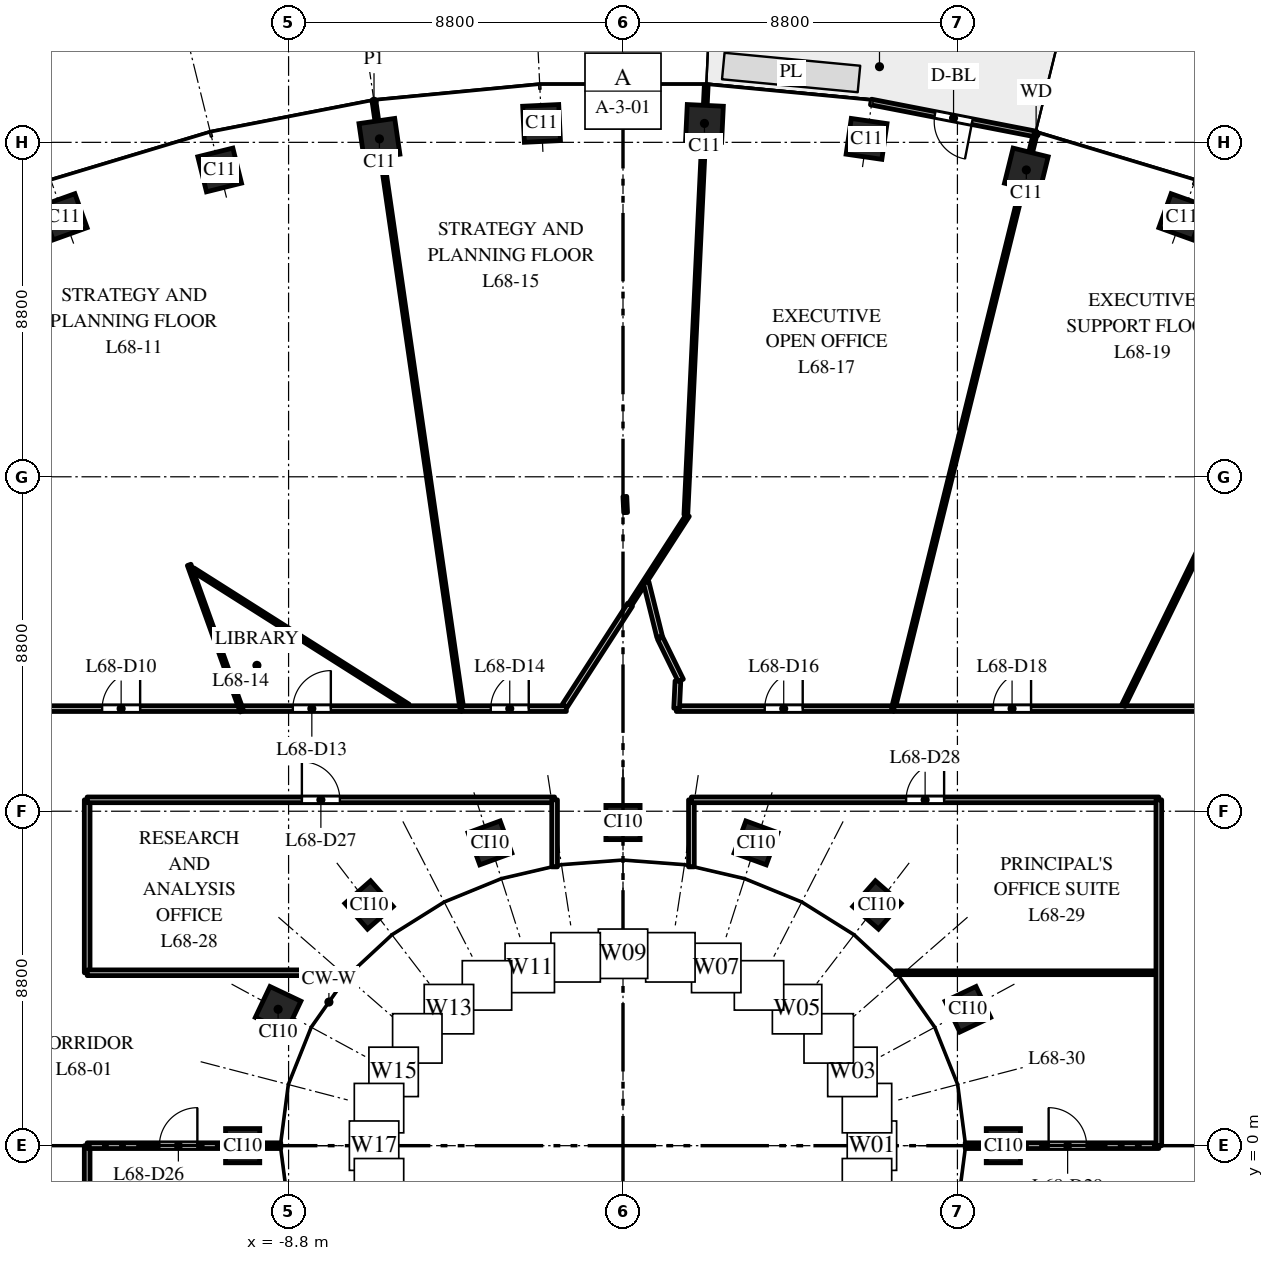
"""IFC4 building model, lengths in metres.
Left out: names, types, materials, properties, quantities, classifications, styles, units other than length and angle.
Written with IfcOpenShell. Run it as: python <this file> out.ifc"""

import sys

from ifc_helpers import new_model, si_unit, direction, frame, frame_2d, origin, origin_2d, place, context, subcontext, project, spatial, rectangle, extrude, element, fill, save


model = new_model("IFC4")
c1 = context("Model", 3, precision=1e-05, world=origin(), true_north=direction((0.0, 1.0)))
c2 = subcontext(c1, "Body", "Model", "MODEL_VIEW")
j1 = project(units=[si_unit("LENGTHUNIT", "METRE"), si_unit("PLANEANGLEUNIT", "RADIAN")], contexts=[c1])
p1 = place(None, origin())
s1 = spatial("IfcSite", under=j1, at=p1, CompositionType="ELEMENT")
p2 = place(p1, origin())
s2 = spatial("IfcBuilding", under=s1, at=p2, CompositionType="ELEMENT")
p3 = place(p2, frame((0.0, 0.0, 315.0)))
s3 = spatial("IfcBuildingStorey", under=s2, at=p3, CompositionType="ELEMENT", Elevation=315.0)
for number, where, z_axis, x_axis in (
    (1, (14.709, 24.441, 0.0), (0.0, 0.0, 1.0), (-0.941, 0.338, 0.0)),
    (2, (10.613, 25.674, 0.0), (0.0, 0.0, 1.0), (-0.971, 0.24, 0.0)),
    (3, (6.409, 26.491, 0.0), (0.0, 0.0, 1.0), (-0.99, 0.143, 0.0)),
    (4, (2.143, 26.898, 0.0), (0.0, 0.0, 1.0), (-0.999, 0.048, 0.0)),
    (5, (-2.143, 26.898, 0.0), (0.0, 0.0, 1.0), (-0.999, -0.048, 0.0)),
    (6, (-6.409, 26.491, 0.0), (0.0, 0.0, 1.0), (-0.99, -0.143, 0.0)),
    (7, (-10.613, 25.674, 0.0), (0.0, 0.0, 1.0), (-0.971, -0.24, 0.0)),
    (8, (-14.709, 24.441, 0.0), (0.0, 0.0, 1.0), (-0.941, -0.338, 0.0)),
):
    element("IfcColumn", number, at=place(p3, frame(where, z_axis=z_axis, x_axis=x_axis)), inside=s3, PredefinedType="COLUMN", context=c2, shape_type="SweptSolid", body=[
        extrude(rectangle(XDim=0.95, YDim=0.95, at=origin_2d()), origin(), (0.0, 0.0, 1.0), 4.0),
    ])
for number, where, z_axis, x_axis in (
    (9, (10.008, 0.0, 0.0), (0.0, 0.0, 1.0), (0.0, 1.0, 0.0)),
    (10, (9.076, 3.588, 0.0), (0.0, 0.0, 1.0), (-0.429, 0.903, 0.0)),
    (11, (6.682, 6.334, 0.0), (0.0, 0.0, 1.0), (-0.751, 0.66, 0.0)),
    (12, (3.501, 7.967, 0.0), (0.0, 0.0, 1.0), (-0.939, 0.344, 0.0)),
    (13, (0.0, 8.503, 0.0), (0.0, 0.0, 1.0), (-1.0, 0.0, 0.0)),
    (14, (-3.501, 7.967, 0.0), (0.0, 0.0, 1.0), (-0.939, -0.344, 0.0)),
    (15, (-6.682, 6.334, 0.0), (0.0, 0.0, 1.0), (-0.751, -0.66, 0.0)),
    (16, (-9.076, 3.588, 0.0), (0.0, 0.0, 1.0), (-0.429, -0.903, 0.0)),
    (17, (-10.008, 0.0, 0.0), (0.0, 0.0, 1.0), (0.0, -1.0, 0.0)),
):
    element("IfcColumn", number, at=place(p3, frame(where, z_axis=z_axis, x_axis=x_axis)), inside=s3, PredefinedType="COLUMN", context=c2, shape_type="SweptSolid", body=[
        extrude(rectangle(XDim=0.9, YDim=0.9, at=origin_2d()), origin(), (0.0, 0.0, 1.0), 4.0),
    ])
p4 = place(p3, frame((10.871, 26.617, 0.0), z_axis=(0.0, 0.0, 1.0), x_axis=(-0.981631174778, 0.190788460615, 0.0)))
e18 = element("IfcWall", 18, at=p4, inside=s3, PredefinedType="STANDARD", context=c2, shape_type="SweptSolid", body=[
    extrude(rectangle(XDim=4.426, YDim=0.15, at=frame_2d((2.213, 0.0))), origin(), (0.0, 0.0, 1.0), 3.7),
])
p5 = place(p4, frame((1.713, 0.0, 0.0)))
e19 = element("IfcOpeningElement", 19, at=p5, cuts=e18, PredefinedType="OPENING", context=c2, shape_type="SweptSolid", body=[
    extrude(rectangle(XDim=1.0, YDim=2.4, at=frame_2d((0.5, 1.2))), frame((0.0, 0.085, 0.0), z_axis=(0.0, -1.0, 0.0), x_axis=(1.0, 0.0, 0.0)), (0.0, 0.0, 1.0), 0.17),
])
p6 = place(p3, frame((-31.5, 11.5, 0.0), z_axis=(0.0, 0.0, 1.0), x_axis=(1.0, 0.0, 0.0)))
e20 = element("IfcWall", 20, at=p6, inside=s3, PredefinedType="PARTITIONING", context=c2, shape_type="SweptSolid", body=[
    extrude(rectangle(XDim=21.432, YDim=0.15, at=frame_2d((10.716, 0.0))), origin(), (0.0, 0.0, 1.0), 2.75),
])
p7 = place(p6, frame((6.926, 0.0, 0.0)))
e21 = element("IfcOpeningElement", 21, at=p7, cuts=e20, PredefinedType="OPENING", context=c2, shape_type="SweptSolid", body=[
    extrude(rectangle(XDim=1.0, YDim=2.1, at=frame_2d((0.5, 1.05))), frame((0.0, 0.085, 0.0), z_axis=(0.0, -1.0, 0.0), x_axis=(1.0, 0.0, 0.0)), (0.0, 0.0, 1.0), 0.17),
])
p8 = place(p6, frame((17.794, 0.0, 0.0)))
e22 = element("IfcOpeningElement", 22, at=p8, cuts=e20, PredefinedType="OPENING", context=c2, shape_type="SweptSolid", body=[
    extrude(rectangle(XDim=1.0, YDim=2.1, at=frame_2d((0.5, 1.05))), frame((0.0, 0.085, 0.0), z_axis=(0.0, -1.0, 0.0), x_axis=(1.0, 0.0, 0.0)), (0.0, 0.0, 1.0), 0.17),
])
p9 = place(p3, frame((-14.1, -9.1, 0.0), z_axis=(0.0, 0.0, 1.0), x_axis=(0.0, 1.0, 0.0)))
e23 = element("IfcWall", 23, at=p9, inside=s3, PredefinedType="PARTITIONING", context=c2, shape_type="SweptSolid", body=[
    extrude(rectangle(XDim=9.1, YDim=0.15, at=frame_2d((4.55, 0.0))), origin(), (0.0, 0.0, 1.0), 3.7),
])
p10 = place(p3, frame((-14.1, 0.0, 0.0), z_axis=(0.0, 0.0, 1.0), x_axis=(1.0, 0.0, 0.0)))
e24 = element("IfcWall", 24, at=p10, inside=s3, PredefinedType="PARTITIONING", context=c2, shape_type="SweptSolid", body=[
    extrude(rectangle(XDim=5.095, YDim=0.15, at=frame_2d((2.548, 0.0))), origin(), (0.0, 0.0, 1.0), 3.7),
])
p11 = place(p10, frame((1.9, 0.0, 0.0)))
e25 = element("IfcOpeningElement", 25, at=p11, cuts=e24, PredefinedType="OPENING", context=c2, shape_type="SweptSolid", body=[
    extrude(rectangle(XDim=1.0, YDim=2.1, at=frame_2d((0.5, 1.05))), frame((0.0, 0.085, 0.0), z_axis=(0.0, -1.0, 0.0), x_axis=(1.0, 0.0, 0.0)), (0.0, 0.0, 1.0), 0.17),
])
p12 = place(p3, frame((-14.1, 4.55, 0.0), z_axis=(0.0, 0.0, 1.0), x_axis=(0.0, 1.0, 0.0)))
e26 = element("IfcWall", 26, at=p12, inside=s3, PredefinedType="PARTITIONING", context=c2, shape_type="SweptSolid", body=[
    extrude(rectangle(XDim=4.55, YDim=0.15, at=frame_2d((2.275, 0.0))), origin(), (0.0, 0.0, 1.0), 3.7),
])
p13 = place(p3, frame((-14.1, 4.55, 0.0), z_axis=(0.0, 0.0, 1.0), x_axis=(1.0, 0.0, 0.0)))
e27 = element("IfcWall", 27, at=p13, inside=s3, PredefinedType="PARTITIONING", context=c2, shape_type="SweptSolid", body=[
    extrude(rectangle(XDim=6.966, YDim=0.15, at=frame_2d((3.483, 0.0))), origin(), (0.0, 0.0, 1.0), 3.0),
])
p14 = place(p3, frame((-14.1, 9.1, 0.0), z_axis=(0.0, 0.0, 1.0), x_axis=(1.0, 0.0, 0.0)))
e28 = element("IfcWall", 28, at=p14, inside=s3, PredefinedType="PARTITIONING", context=c2, shape_type="SweptSolid", body=[
    extrude(rectangle(XDim=12.3, YDim=0.15, at=frame_2d((6.15, 0.0))), origin(), (0.0, 0.0, 1.0), 2.75),
])
p15 = place(p14, frame((5.65, 0.0, 0.0)))
e29 = element("IfcOpeningElement", 29, at=p15, cuts=e28, PredefinedType="OPENING", context=c2, shape_type="SweptSolid", body=[
    extrude(rectangle(XDim=1.0, YDim=2.1, at=frame_2d((0.5, 1.05))), frame((0.0, 0.085, 0.0), z_axis=(0.0, -1.0, 0.0), x_axis=(1.0, 0.0, 0.0)), (0.0, 0.0, 1.0), 0.17),
])
p16 = place(p3, frame((-11.416, 15.282, 0.0), z_axis=(0.0, 0.0, 1.0), x_axis=(0.33848088015, -0.940973269425, 0.0)))
e30 = element("IfcWall", 30, at=p16, inside=s3, PredefinedType="PARTITIONING", context=c2, shape_type="SweptSolid", body=[
    extrude(rectangle(XDim=4.095, YDim=0.1, at=frame_2d((2.047, 0.0))), origin(), (0.0, 0.0, 1.0), 2.75),
])
p17 = place(p3, frame((-11.319, 15.161, 0.0), z_axis=(0.0, 0.0, 1.0), x_axis=(0.844865171483, -0.534979291203, 0.0)))
e31 = element("IfcWall", 31, at=p17, inside=s3, PredefinedType="PARTITIONING", context=c2, shape_type="SweptSolid", body=[
    extrude(rectangle(XDim=6.703, YDim=0.1, at=frame_2d((3.352, 0.0))), origin(), (0.0, 0.0, 1.0), 3.7),
])
p18 = place(p3, frame((-10.003, 11.5, 0.0), z_axis=(0.0, 0.0, 1.0), x_axis=(1.0, 0.0, 0.0)))
e32 = element("IfcWall", 32, at=p18, inside=s3, PredefinedType="PARTITIONING", context=c2, shape_type="SweptSolid", body=[
    extrude(rectangle(XDim=5.741, YDim=0.15, at=frame_2d((2.871, 0.0))), origin(), (0.0, 0.0, 1.0), 2.75),
])
p19 = place(p18, frame((1.315, 0.0, 0.0)))
e33 = element("IfcOpeningElement", 33, at=p19, cuts=e32, PredefinedType="OPENING", context=c2, shape_type="SweptSolid", body=[
    extrude(rectangle(XDim=1.0, YDim=2.1, at=frame_2d((0.5, 1.05))), frame((0.0, 0.085, 0.0), z_axis=(0.0, -1.0, 0.0), x_axis=(1.0, 0.0, 0.0)), (0.0, 0.0, 1.0), 0.17),
])
p20 = place(p3, frame((-6.552, 27.481, 0.0), z_axis=(0.0, 0.0, 1.0), x_axis=(0.143123019969, -0.989704906098, 0.0)))
e34 = element("IfcWall", 34, at=p20, inside=s3, PredefinedType="PARTITIONING", context=c2, shape_type="SweptSolid", body=[
    extrude(rectangle(XDim=16.147, YDim=0.1, at=frame_2d((8.074, 0.0))), origin(), (0.0, 0.0, 1.0), 3.0),
])
p21 = place(p3, frame((-4.242, 11.5, 0.0), z_axis=(0.0, 0.0, 1.0), x_axis=(1.0, 0.0, 0.0)))
e35 = element("IfcWall", 35, at=p21, inside=s3, PredefinedType="PARTITIONING", context=c2, shape_type="SweptSolid", body=[
    extrude(rectangle(XDim=2.751, YDim=0.15, at=frame_2d((1.375, 0.0))), origin(), (0.0, 0.0, 1.0), 3.7),
])
p22 = place(p21, frame((0.762, 0.0, 0.0)))
e36 = element("IfcOpeningElement", 36, at=p22, cuts=e35, PredefinedType="OPENING", context=c2, shape_type="SweptSolid", body=[
    extrude(rectangle(XDim=1.0, YDim=2.1, at=frame_2d((0.5, 1.05))), frame((0.0, 0.085, 0.0), z_axis=(0.0, -1.0, 0.0), x_axis=(1.0, 0.0, 0.0)), (0.0, 0.0, 1.0), 0.17),
])
p23 = place(p3, frame((-1.8, 7.336, 0.0), z_axis=(0.0, 0.0, 1.0), x_axis=(0.0, 1.0, 0.0)))
e37 = element("IfcWall", 37, at=p23, inside=s3, PredefinedType="PARTITIONING", context=c2, shape_type="SweptSolid", body=[
    extrude(rectangle(XDim=1.764, YDim=0.15, at=frame_2d((0.882, 0.0))), origin(), (0.0, 0.0, 1.0), 3.0),
])
p24 = place(p3, frame((-1.532, 11.575, 0.0), z_axis=(0.0, 0.0, 1.0), x_axis=(0.542841801378, 0.839834971096, 0.0)))
e38 = element("IfcWall", 38, at=p24, inside=s3, PredefinedType="PARTITIONING", context=c2, shape_type="SweptSolid", body=[
    extrude(rectangle(XDim=3.165, YDim=0.15, at=frame_2d((1.583, 0.0))), origin(), (0.0, 0.0, 1.0), 2.85),
])
p25 = place(p3, frame((0.049, 17.081, 0.0), z_axis=(0.0, 0.0, 1.0), x_axis=(0.047263912187, -0.998882436829, 0.0)))
e39 = element("IfcWall", 39, at=p25, inside=s3, PredefinedType="PARTITIONING", context=c2, shape_type="SweptSolid", body=[
    extrude(rectangle(XDim=0.424, YDim=0.1, at=frame_2d((0.212, 0.0))), origin(), (0.0, 0.0, 1.0), 3.7),
])
p26 = place(p3, frame((0.185, 14.234, 0.0), z_axis=(0.0, 0.0, 1.0), x_axis=(0.542379210567, 0.840133794074, 0.0)))
e40 = element("IfcWall", 40, at=p26, inside=s3, PredefinedType="PARTITIONING", context=c2, shape_type="SweptSolid", body=[
    extrude(rectangle(XDim=2.798, YDim=0.1, at=frame_2d((1.399, 0.0))), origin(), (0.0, 0.0, 1.0), 3.7),
])
p27 = place(p3, frame((0.608, 14.822, 0.0), z_axis=(0.0, 0.0, 1.0), x_axis=(0.241370860872, -0.970432948494, 0.0)))
e41 = element("IfcWall", 41, at=p27, inside=s3, PredefinedType="PARTITIONING", context=c2, shape_type="SweptSolid", body=[
    extrude(rectangle(XDim=1.48, YDim=0.15, at=frame_2d((0.74, 0.0))), origin(), (0.0, 0.0, 1.0), 3.7),
])
p28 = place(p3, frame((0.977, 13.353, 0.0), z_axis=(0.0, 0.0, 1.0), x_axis=(0.439698529064, -0.898145424494, 0.0)))
e42 = element("IfcWall", 42, at=p28, inside=s3, PredefinedType="PARTITIONING", context=c2, shape_type="SweptSolid", body=[
    extrude(rectangle(XDim=1.237, YDim=0.15, at=frame_2d((0.619, 0.0))), origin(), (0.0, 0.0, 1.0), 3.7),
])
p29 = place(p3, frame((1.403, 11.5, 0.0), z_axis=(0.0, 0.0, 1.0), x_axis=(1.0, 0.0, 0.0)))
e43 = element("IfcWall", 43, at=p29, inside=s3, PredefinedType="PARTITIONING", context=c2, shape_type="SweptSolid", body=[
    extrude(rectangle(XDim=5.709, YDim=0.15, at=frame_2d((2.854, 0.0))), origin(), (0.0, 0.0, 1.0), 2.85),
])
p30 = place(p29, frame((2.326, 0.0, 0.0)))
e44 = element("IfcOpeningElement", 44, at=p30, cuts=e43, PredefinedType="OPENING", context=c2, shape_type="SweptSolid", body=[
    extrude(rectangle(XDim=1.0, YDim=2.1, at=frame_2d((0.5, 1.05))), frame((0.0, 0.085, 0.0), z_axis=(0.0, -1.0, 0.0), x_axis=(1.0, 0.0, 0.0)), (0.0, 0.0, 1.0), 0.17),
])
p31 = place(p3, frame((1.411, 11.507, 0.0), z_axis=(0.0, 0.0, 1.0), x_axis=(0.047484575885, 0.998871971302, 0.0)))
e45 = element("IfcWall", 45, at=p31, inside=s3, PredefinedType="PARTITIONING", context=c2, shape_type="SweptSolid", body=[
    extrude(rectangle(XDim=0.72, YDim=0.15, at=frame_2d((0.36, 0.0))), origin(), (0.0, 0.0, 1.0), 3.7),
])
p32 = place(p3, frame((1.654, 16.6, 0.0), z_axis=(0.0, 0.0, 1.0), x_axis=(0.047379525596, 0.998876959667, 0.0)))
e46 = element("IfcWall", 46, at=p32, inside=s3, PredefinedType="PARTITIONING", context=c2, shape_type="SweptSolid", body=[
    extrude(rectangle(XDim=11.311, YDim=0.1, at=frame_2d((5.655, 0.0))), origin(), (0.0, 0.0, 1.0), 3.0),
])
p33 = place(p3, frame((1.8, 7.336, 0.0), z_axis=(0.0, 0.0, 1.0), x_axis=(0.0, 1.0, 0.0)))
e47 = element("IfcWall", 47, at=p33, inside=s3, PredefinedType="PARTITIONING", context=c2, shape_type="SweptSolid", body=[
    extrude(rectangle(XDim=1.764, YDim=0.15, at=frame_2d((0.882, 0.0))), origin(), (0.0, 0.0, 1.0), 3.0),
])
p34 = place(p3, frame((1.8, 9.1, 0.0), z_axis=(0.0, 0.0, 1.0), x_axis=(1.0, 0.0, 0.0)))
e48 = element("IfcWall", 48, at=p34, inside=s3, PredefinedType="PARTITIONING", context=c2, shape_type="SweptSolid", body=[
    extrude(rectangle(XDim=12.3, YDim=0.15, at=frame_2d((6.15, 0.0))), origin(), (0.0, 0.0, 1.0), 2.85),
])
p35 = place(p34, frame((5.65, 0.0, 0.0)))
e49 = element("IfcOpeningElement", 49, at=p35, cuts=e48, PredefinedType="OPENING", context=c2, shape_type="SweptSolid", body=[
    extrude(rectangle(XDim=1.0, YDim=2.1, at=frame_2d((0.5, 1.05))), frame((0.0, 0.085, 0.0), z_axis=(0.0, -1.0, 0.0), x_axis=(1.0, 0.0, 0.0)), (0.0, 0.0, 1.0), 0.17),
])
p36 = place(p3, frame((7.113, 11.5, 0.0), z_axis=(0.0, 0.0, 1.0), x_axis=(0.239728816148, 0.970839891387, 0.0)))
e50 = element("IfcWall", 50, at=p36, inside=s3, PredefinedType="PARTITIONING", context=c2, shape_type="SweptSolid", body=[
    extrude(rectangle(XDim=15.601, YDim=0.1, at=frame_2d((7.8, 0.0))), origin(), (0.0, 0.0, 1.0), 2.85),
])
p37 = place(p3, frame((7.129, 11.5, 0.0), z_axis=(0.0, 0.0, 1.0), x_axis=(1.0, 0.0, 0.0)))
e51 = element("IfcWall", 51, at=p37, inside=s3, PredefinedType="PARTITIONING", context=c2, shape_type="SweptSolid", body=[
    extrude(rectangle(XDim=24.371, YDim=0.15, at=frame_2d((12.186, 0.0))), origin(), (0.0, 0.0, 1.0), 2.75),
])
p38 = place(p37, frame((2.609, 0.0, 0.0)))
e52 = element("IfcOpeningElement", 52, at=p38, cuts=e51, PredefinedType="OPENING", context=c2, shape_type="SweptSolid", body=[
    extrude(rectangle(XDim=1.0, YDim=2.1, at=frame_2d((0.5, 1.05))), frame((0.0, 0.085, 0.0), z_axis=(0.0, -1.0, 0.0), x_axis=(1.0, 0.0, 0.0)), (0.0, 0.0, 1.0), 0.17),
])
p39 = place(p37, frame((9.1, 0.0, 0.0)))
e53 = element("IfcOpeningElement", 53, at=p39, cuts=e51, PredefinedType="OPENING", context=c2, shape_type="SweptSolid", body=[
    extrude(rectangle(XDim=1.0, YDim=2.1, at=frame_2d((0.5, 1.05))), frame((0.0, 0.085, 0.0), z_axis=(0.0, -1.0, 0.0), x_axis=(1.0, 0.0, 0.0)), (0.0, 0.0, 1.0), 0.17),
])
p40 = place(p37, frame((17.755, 0.0, 0.0)))
e54 = element("IfcOpeningElement", 54, at=p40, cuts=e51, PredefinedType="OPENING", context=c2, shape_type="SweptSolid", body=[
    extrude(rectangle(XDim=1.0, YDim=2.1, at=frame_2d((0.5, 1.05))), frame((0.0, 0.085, 0.0), z_axis=(0.0, -1.0, 0.0), x_axis=(1.0, 0.0, 0.0)), (0.0, 0.0, 1.0), 0.17),
])
p41 = place(p3, frame((7.174, 4.55, 0.0), z_axis=(0.0, 0.0, 1.0), x_axis=(1.0, 0.0, 0.0)))
e55 = element("IfcWall", 55, at=p41, inside=s3, PredefinedType="PARTITIONING", context=c2, shape_type="SweptSolid", body=[
    extrude(rectangle(XDim=6.851, YDim=0.1, at=frame_2d((3.425, 0.0))), origin(), (0.0, 0.0, 1.0), 2.75),
])
p42 = place(p3, frame((9.005, 0.0, 0.0), z_axis=(0.0, 0.0, 1.0), x_axis=(1.0, 0.0, 0.0)))
e56 = element("IfcWall", 56, at=p42, inside=s3, PredefinedType="PARTITIONING", context=c2, shape_type="SweptSolid", body=[
    extrude(rectangle(XDim=5.095, YDim=0.15, at=frame_2d((2.548, 0.0))), origin(), (0.0, 0.0, 1.0), 3.7),
])
p43 = place(p42, frame((2.195, 0.0, 0.0)))
e57 = element("IfcOpeningElement", 57, at=p43, cuts=e56, PredefinedType="OPENING", context=c2, shape_type="SweptSolid", body=[
    extrude(rectangle(XDim=1.0, YDim=2.1, at=frame_2d((0.5, 1.05))), frame((0.0, 0.085, 0.0), z_axis=(0.0, -1.0, 0.0), x_axis=(1.0, 0.0, 0.0)), (0.0, 0.0, 1.0), 0.17),
])
p44 = place(p3, frame((13.167, 11.579, 0.0), z_axis=(0.0, 0.0, 1.0), x_axis=(0.439238726833, 0.898370380661, 0.0)))
e58 = element("IfcWall", 58, at=p44, inside=s3, PredefinedType="PARTITIONING", context=c2, shape_type="SweptSolid", body=[
    extrude(rectangle(XDim=13.475, YDim=0.1, at=frame_2d((6.738, 0.0))), origin(), (0.0, 0.0, 1.0), 3.0),
])
p45 = place(p3, frame((14.1, 0.0, 0.0), z_axis=(0.0, 0.0, 1.0), x_axis=(0.0, 1.0, 0.0)))
e59 = element("IfcWall", 59, at=p45, inside=s3, PredefinedType="PARTITIONING", context=c2, shape_type="SweptSolid", body=[
    extrude(rectangle(XDim=9.1, YDim=0.15, at=frame_2d((4.55, 0.0))), origin(), (0.0, 0.0, 1.0), 2.75),
])
p46 = place(p5, origin())
e60 = element("IfcDoor", 60, at=p46, inside=s3, OperationType="SINGLE_SWING_LEFT", PredefinedType="DOOR", context=c2, shape_type="SweptSolid", body=[
    extrude(rectangle(XDim=1.0, YDim=2.4, at=frame_2d((0.5, 1.2))), frame((0.0, 0.025, 0.0), z_axis=(0.0, -1.0, 0.0), x_axis=(1.0, 0.0, 0.0)), (0.0, 0.0, 1.0), 0.05),
])
fill(e19, e60)
p47 = place(p8, origin())
e61 = element("IfcDoor", 61, at=p47, inside=s3, OperationType="SINGLE_SWING_RIGHT", PredefinedType="DOOR", context=c2, shape_type="SweptSolid", body=[
    extrude(rectangle(XDim=1.0, YDim=2.1, at=frame_2d((0.5, 1.05))), frame((0.0, 0.025, 0.0), z_axis=(0.0, -1.0, 0.0), x_axis=(1.0, 0.0, 0.0)), (0.0, 0.0, 1.0), 0.05),
])
fill(e22, e61)
p48 = place(p19, origin())
e62 = element("IfcDoor", 62, at=p48, inside=s3, OperationType="SINGLE_SWING_RIGHT", PredefinedType="DOOR", context=c2, shape_type="SweptSolid", body=[
    extrude(rectangle(XDim=1.0, YDim=2.1, at=frame_2d((0.5, 1.05))), frame((0.0, 0.025, 0.0), z_axis=(0.0, -1.0, 0.0), x_axis=(1.0, 0.0, 0.0)), (0.0, 0.0, 1.0), 0.05),
])
fill(e33, e62)
p49 = place(p22, origin())
e63 = element("IfcDoor", 63, at=p49, inside=s3, OperationType="SINGLE_SWING_RIGHT", PredefinedType="DOOR", context=c2, shape_type="SweptSolid", body=[
    extrude(rectangle(XDim=1.0, YDim=2.1, at=frame_2d((0.5, 1.05))), frame((0.0, 0.025, 0.0), z_axis=(0.0, -1.0, 0.0), x_axis=(1.0, 0.0, 0.0)), (0.0, 0.0, 1.0), 0.05),
])
fill(e36, e63)
p50 = place(p30, origin())
e64 = element("IfcDoor", 64, at=p50, inside=s3, OperationType="SINGLE_SWING_RIGHT", PredefinedType="DOOR", context=c2, shape_type="SweptSolid", body=[
    extrude(rectangle(XDim=1.0, YDim=2.1, at=frame_2d((0.5, 1.05))), frame((0.0, 0.025, 0.0), z_axis=(0.0, -1.0, 0.0), x_axis=(1.0, 0.0, 0.0)), (0.0, 0.0, 1.0), 0.05),
])
fill(e44, e64)
p51 = place(p38, origin())
e65 = element("IfcDoor", 65, at=p51, inside=s3, OperationType="SINGLE_SWING_RIGHT", PredefinedType="DOOR", context=c2, shape_type="SweptSolid", body=[
    extrude(rectangle(XDim=1.0, YDim=2.1, at=frame_2d((0.5, 1.05))), frame((0.0, 0.025, 0.0), z_axis=(0.0, -1.0, 0.0), x_axis=(1.0, 0.0, 0.0)), (0.0, 0.0, 1.0), 0.05),
])
fill(e52, e65)
p52 = place(p11, origin())
e66 = element("IfcDoor", 66, at=p52, inside=s3, OperationType="SINGLE_SWING_RIGHT", PredefinedType="DOOR", context=c2, shape_type="SweptSolid", body=[
    extrude(rectangle(XDim=1.0, YDim=2.1, at=frame_2d((0.5, 1.05))), frame((0.0, 0.025, 0.0), z_axis=(0.0, -1.0, 0.0), x_axis=(1.0, 0.0, 0.0)), (0.0, 0.0, 1.0), 0.05),
])
fill(e25, e66)
p53 = place(p15, origin())
e67 = element("IfcDoor", 67, at=p53, inside=s3, OperationType="SINGLE_SWING_LEFT", PredefinedType="DOOR", context=c2, shape_type="SweptSolid", body=[
    extrude(rectangle(XDim=1.0, YDim=2.1, at=frame_2d((0.5, 1.05))), frame((0.0, 0.025, 0.0), z_axis=(0.0, -1.0, 0.0), x_axis=(1.0, 0.0, 0.0)), (0.0, 0.0, 1.0), 0.05),
])
fill(e29, e67)
p54 = place(p35, origin())
e68 = element("IfcDoor", 68, at=p54, inside=s3, OperationType="SINGLE_SWING_RIGHT", PredefinedType="DOOR", context=c2, shape_type="SweptSolid", body=[
    extrude(rectangle(XDim=1.0, YDim=2.1, at=frame_2d((0.5, 1.05))), frame((0.0, 0.025, 0.0), z_axis=(0.0, -1.0, 0.0), x_axis=(1.0, 0.0, 0.0)), (0.0, 0.0, 1.0), 0.05),
])
fill(e49, e68)
p55 = place(p43, origin())
e69 = element("IfcDoor", 69, at=p55, inside=s3, OperationType="SINGLE_SWING_LEFT", PredefinedType="DOOR", context=c2, shape_type="SweptSolid", body=[
    extrude(rectangle(XDim=1.0, YDim=2.1, at=frame_2d((0.5, 1.05))), frame((0.0, 0.025, 0.0), z_axis=(0.0, -1.0, 0.0), x_axis=(1.0, 0.0, 0.0)), (0.0, 0.0, 1.0), 0.05),
])
fill(e57, e69)
save(model, sys.argv[1])
